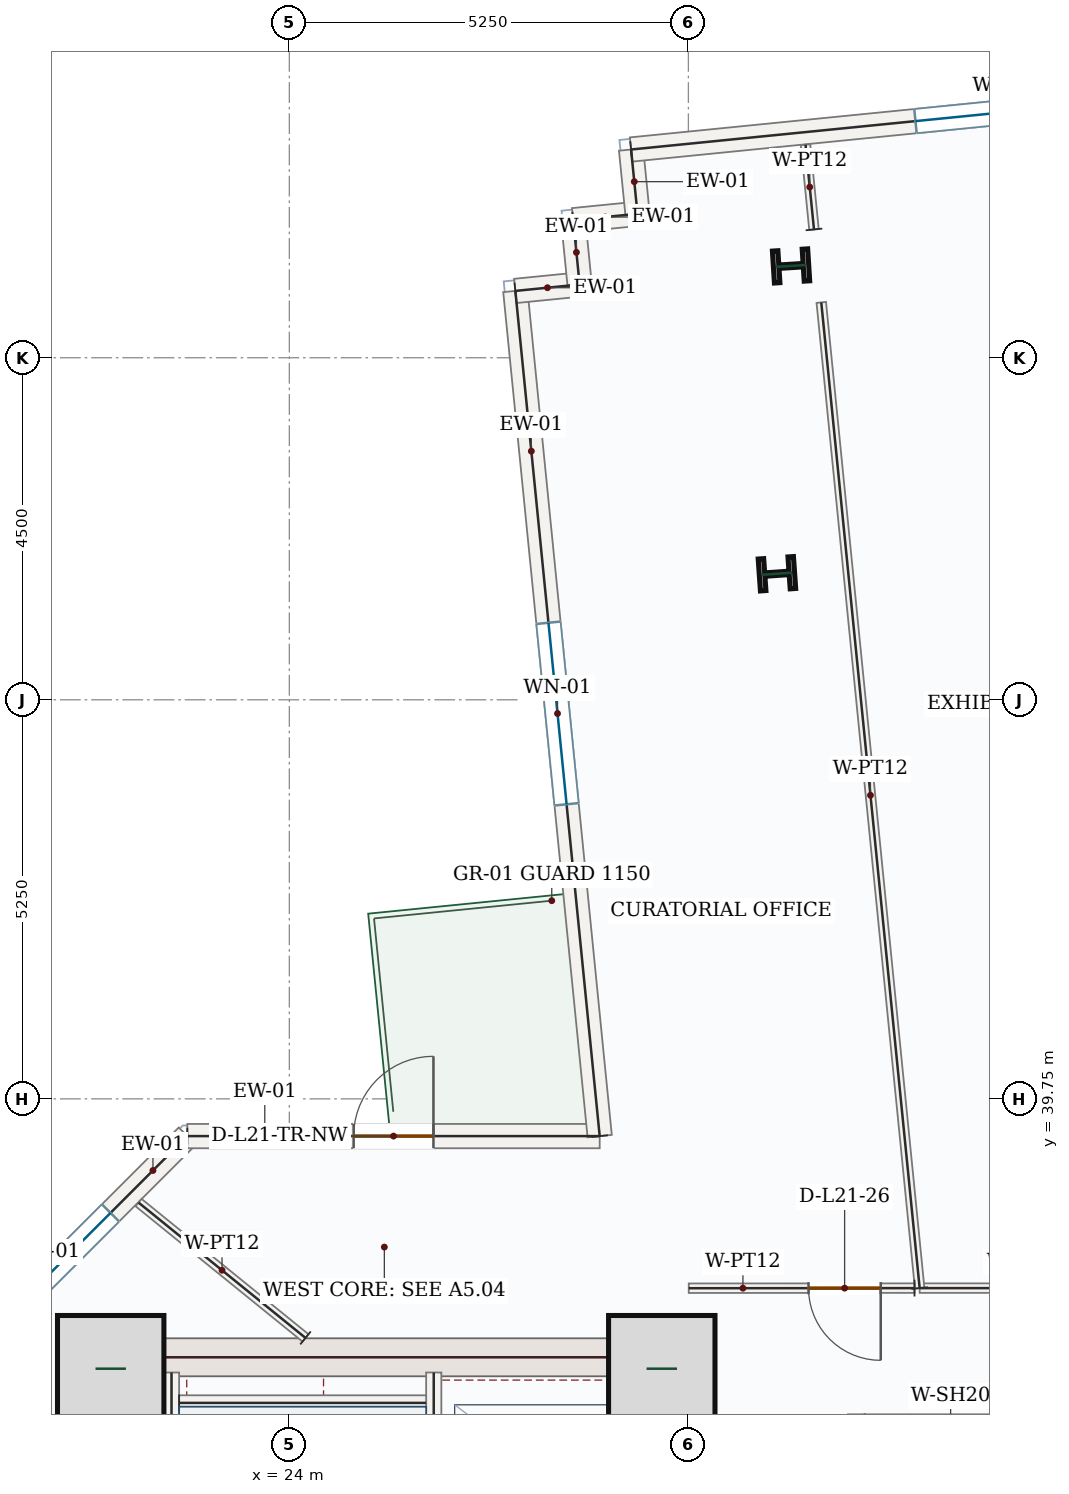
"""IFC4 building model, lengths in metres.
Left out: names, types, materials, properties, quantities, classifications, styles, units other than length and angle.
Written with IfcOpenShell. Run it as: python <this file> out.ifc"""

import sys

from ifc_helpers import new_model, si_unit, direction, frame, frame_2d, origin, origin_2d, place, context, subcontext, project, spatial, rectangle, i_section, extrude, source, transform, mapped, element, fill, save


model = new_model("IFC4")
c1 = context("Model", 3, precision=1e-05, world=origin(), true_north=direction((0.0, 1.0)))
c2 = subcontext(c1, "Body", "Model", "MODEL_VIEW")
j1 = project(units=[si_unit("LENGTHUNIT", "METRE"), si_unit("PLANEANGLEUNIT", "RADIAN")], contexts=[c1])
p1 = place(None, origin())
s1 = spatial("IfcSite", under=j1, at=p1, CompositionType="ELEMENT")
p2 = place(p1, origin())
s2 = spatial("IfcBuilding", under=s1, at=p2, CompositionType="ELEMENT")
p3 = place(p2, frame((0.0, 0.0, 96.3)))
s3 = spatial("IfcBuildingStorey", under=s2, at=p3, CompositionType="ELEMENT", Elevation=96.3)
m1 = source(origin(), c2, "Body", "SweptSolid", [
    extrude(rectangle(XDim=8.55, YDim=0.5, at=frame_2d((4.275, 0.0))), origin(), (0.0, 0.0, 1.0), 3.95),
])
p4 = place(p3, frame((21.5, 28.05, 0.0), z_axis=(0.0, 0.0, 1.0), x_axis=(0.0, 1.0, 0.0)))
e1 = element("IfcWall", 1, at=p4, inside=s3, PredefinedType="SHEAR", context=c2, shape_type="MappedRepresentation", body=[
    mapped(m1, transform((0.0, 0.0, 0.0), x_axis=(1.0, 0.0, 0.0), y_axis=(0.0, 1.0, 0.0), z_axis=(0.0, 0.0, 1.0), scale=1.0)),
])
p5 = place(p3, frame((29.0, 28.05, 0.0), z_axis=(0.0, 0.0, 1.0), x_axis=(0.0, 1.0, 0.0)))
e2 = element("IfcWall", 2, at=p5, inside=s3, PredefinedType="SHEAR", context=c2, shape_type="SweptSolid", body=[
    extrude(rectangle(XDim=8.55, YDim=0.5, at=frame_2d((4.275, 0.0))), origin(), (0.0, 0.0, 1.0), 3.95),
])
p6 = place(p5, frame((1.5, 0.0, 0.0)))
e3 = element("IfcOpeningElement", 3, at=p6, cuts=e2, PredefinedType="OPENING", context=c2, shape_type="SweptSolid", body=[
    extrude(rectangle(XDim=1.1, YDim=2.2, at=frame_2d((0.55, 1.1))), frame((0.0, 0.26, 0.0), z_axis=(0.0, -1.0, 0.0), x_axis=(1.0, 0.0, 0.0)), (0.0, 0.0, 1.0), 0.52),
])
m2 = source(origin(), c2, "Body", "SweptSolid", [
    extrude(rectangle(XDim=7.0, YDim=0.5, at=frame_2d((3.5, 0.0))), origin(), (0.0, 0.0, 1.0), 3.95),
])
p7 = place(p3, frame((21.75, 36.35, 0.0), z_axis=(0.0, 0.0, 1.0), x_axis=(1.0, 0.0, 0.0)))
e4 = element("IfcWall", 4, at=p7, inside=s3, PredefinedType="SHEAR", context=c2, shape_type="MappedRepresentation", body=[
    mapped(m2, transform((0.0, 0.0, 0.0), x_axis=(1.0, 0.0, 0.0), y_axis=(0.0, 1.0, 0.0), z_axis=(0.0, 0.0, 1.0), scale=1.0)),
])
m3 = source(origin(), c2, "Body", "SweptSolid", [
    extrude(rectangle(XDim=1.4, YDim=1.4, at=origin_2d()), origin(), (0.0, 0.0, 1.0), 4.2),
])
for number, where, z_axis, x_axis in (
    (5, (21.65, 36.2, 0.0), (0.0, 0.0, 1.0), (1.0, 0.0, 0.0)),
    (6, (28.9, 36.2, 0.0), (0.0, 0.0, 1.0), (1.0, 0.0, 0.0)),
):
    element("IfcColumn", number, at=place(p3, frame(where, z_axis=z_axis, x_axis=x_axis)), inside=s3, PredefinedType="COLUMN", context=c2, shape_type="MappedRepresentation", body=[
        mapped(m3, transform((0.0, 0.0, 0.0), x_axis=(1.0, 0.0, 0.0), y_axis=(0.0, 1.0, 0.0), z_axis=(0.0, 0.0, 1.0), scale=1.0)),
    ])
m4 = source(origin(), c2, "Body", "SweptSolid", [
    extrude(i_section(OverallWidth=0.421, OverallDepth=0.465, WebThickness=0.045, FlangeThickness=0.073, FilletRadius=0.018, at=origin_2d()), origin(), (0.0, 0.0, 1.0), 4.2),
])
for number, where, z_axis, x_axis in (
    (7, (30.415, 46.658, 0.0), (0.0, 0.0, 1.0), (-0.07, 0.998, 0.0)),
    (8, (30.601, 50.708, 0.0), (0.0, 0.0, 1.0), (-0.063, 0.998, 0.0)),
):
    element("IfcColumn", number, at=place(p3, frame(where, z_axis=z_axis, x_axis=x_axis)), inside=s3, PredefinedType="COLUMN", context=c2, shape_type="MappedRepresentation", body=[
        mapped(m4, transform((0.0, 0.0, 0.0), x_axis=(1.0, 0.0, 0.0), y_axis=(0.0, 1.0, 0.0), z_axis=(0.0, 0.0, 1.0), scale=1.0)),
    ])
p8 = place(p3, frame((18.94, 35.542, 0.0), z_axis=(0.0, 0.0, 1.0), x_axis=(0.707106781187, 0.707106781187, 0.0)))
e9 = element("IfcWall", 9, at=p8, inside=s3, PredefinedType="SOLIDWALL", context=c2, shape_type="SweptSolid", body=[
    extrude(rectangle(XDim=5.258, YDim=0.32, at=frame_2d((2.629, 0.0))), origin(), (0.0, 0.0, 1.0), 3.95),
])
p9 = place(p8, frame((1.429, 0.0, 0.85)))
e10 = element("IfcOpeningElement", 10, at=p9, cuts=e9, PredefinedType="OPENING", context=c2, shape_type="SweptSolid", body=[
    extrude(rectangle(XDim=2.4, YDim=1.8, at=frame_2d((1.2, 0.9))), frame((0.0, 0.17, 0.0), z_axis=(0.0, -1.0, 0.0), x_axis=(1.0, 0.0, 0.0)), (0.0, 0.0, 1.0), 0.34),
])
p10 = place(p3, frame((22.658, 39.26, 0.0), z_axis=(0.0, 0.0, 1.0), x_axis=(1.0, 0.0, 0.0)))
e11 = element("IfcWall", 11, at=p10, inside=s3, PredefinedType="SOLIDWALL", context=c2, shape_type="SweptSolid", body=[
    extrude(rectangle(XDim=5.425, YDim=0.32, at=frame_2d((2.713, 0.0))), origin(), (0.0, 0.0, 1.0), 3.95),
])
p11 = place(p10, frame((2.188, 0.0, 0.0)))
e12 = element("IfcOpeningElement", 12, at=p11, cuts=e11, PredefinedType="OPENING", context=c2, shape_type="SweptSolid", body=[
    extrude(rectangle(XDim=1.05, YDim=2.15, at=frame_2d((0.525, 1.075))), frame((0.0, 0.17, 0.0), z_axis=(0.0, -1.0, 0.0), x_axis=(1.0, 0.0, 0.0)), (0.0, 0.0, 1.0), 0.34),
])
p12 = place(p3, frame((28.083, 39.26, 0.0), z_axis=(0.0, 0.0, 1.0), x_axis=(-0.099322009391, 0.995055344416, 0.0)))
e13 = element("IfcWall", 13, at=p12, inside=s3, PredefinedType="SOLIDWALL", context=c2, shape_type="SweptSolid", body=[
    extrude(rectangle(XDim=11.174, YDim=0.32, at=frame_2d((5.587, 0.0))), origin(), (0.0, 0.0, 1.0), 3.95),
])
p13 = place(p12, frame((4.387, 0.0, 0.85)))
e14 = element("IfcOpeningElement", 14, at=p13, cuts=e13, PredefinedType="OPENING", context=c2, shape_type="SweptSolid", body=[
    extrude(rectangle(XDim=2.4, YDim=1.8, at=frame_2d((1.2, 0.9))), frame((0.0, 0.17, 0.0), z_axis=(0.0, -1.0, 0.0), x_axis=(1.0, 0.0, 0.0)), (0.0, 0.0, 1.0), 0.34),
])
m5 = source(origin(), c2, "Body", "SweptSolid", [
    extrude(rectangle(XDim=0.85, YDim=0.32, at=frame_2d((0.425, 0.0))), origin(), (0.0, 0.0, 1.0), 3.95),
])
p14 = place(p3, frame((26.973, 50.379, 0.0), z_axis=(0.0, 0.0, 1.0), x_axis=(0.995076929088, 0.099105525559, 0.0)))
e15 = element("IfcWall", 15, at=p14, inside=s3, PredefinedType="SOLIDWALL", context=c2, shape_type="MappedRepresentation", body=[
    mapped(m5, transform((0.0, 0.0, 0.0), x_axis=(1.0, 0.0, 0.0), y_axis=(0.0, 1.0, 0.0), z_axis=(0.0, 0.0, 1.0), scale=1.0)),
])
m6 = source(origin(), c2, "Body", "SweptSolid", [
    extrude(rectangle(XDim=0.85, YDim=0.32, at=frame_2d((0.425, 0.0))), origin(), (0.0, 0.0, 1.0), 3.95),
])
for number, where, z_axis, x_axis in (
    (16, (27.819, 50.463, 0.0), (0.0, 0.0, 1.0), (-0.099, 0.995, 0.0)),
    (17, (27.735, 51.309, 0.0), (0.0, 0.0, 1.0), (0.995, 0.099, 0.0)),
):
    element("IfcWall", number, at=place(p3, frame(where, z_axis=z_axis, x_axis=x_axis)), inside=s3, PredefinedType="SOLIDWALL", context=c2, shape_type="MappedRepresentation", body=[
        mapped(m6, transform((0.0, 0.0, 0.0), x_axis=(1.0, 0.0, 0.0), y_axis=(0.0, 1.0, 0.0), z_axis=(0.0, 0.0, 1.0), scale=1.0)),
    ])
p15 = place(p3, frame((28.581, 51.394, 0.0), z_axis=(0.0, 0.0, 1.0), x_axis=(-0.09938995433, 0.995048560111, 0.0)))
e18 = element("IfcWall", 18, at=p15, inside=s3, PredefinedType="SOLIDWALL", context=c2, shape_type="MappedRepresentation", body=[
    mapped(m5, transform((0.0, 0.0, 0.0), x_axis=(1.0, 0.0, 0.0), y_axis=(0.0, 1.0, 0.0), z_axis=(0.0, 0.0, 1.0), scale=1.0)),
])
p16 = place(p3, frame((28.496, 52.24, 0.0), z_axis=(0.0, 0.0, 1.0), x_axis=(0.995054718915, 0.09932827576, 0.0)))
e19 = element("IfcWall", 19, at=p16, inside=s3, PredefinedType="SOLIDWALL", context=c2, shape_type="SweptSolid", body=[
    extrude(rectangle(XDim=9.92, YDim=0.32, at=frame_2d((4.96, 0.0))), origin(), (0.0, 0.0, 1.0), 3.95),
])
p17 = place(p16, frame((3.76, 0.0, 0.85)))
e20 = element("IfcOpeningElement", 20, at=p17, cuts=e19, PredefinedType="OPENING", context=c2, shape_type="SweptSolid", body=[
    extrude(rectangle(XDim=2.4, YDim=1.8, at=frame_2d((1.2, 0.9))), frame((0.0, 0.17, 0.0), z_axis=(0.0, -1.0, 0.0), x_axis=(1.0, 0.0, 0.0)), (0.0, 0.0, 1.0), 0.34),
])
m7 = source(origin(), c2, "Body", "SweptSolid", [
    extrude(rectangle(XDim=7.87, YDim=0.2, at=frame_2d((3.935, 0.0))), origin(), (0.0, 0.0, 1.0), 3.95),
])
p18 = place(p3, frame((22.45, 28.28, 0.0), z_axis=(0.0, 0.0, 1.0), x_axis=(0.0, 1.0, 0.0)))
e21 = element("IfcWall", 21, at=p18, inside=s3, PredefinedType="SOLIDWALL", context=c2, shape_type="MappedRepresentation", body=[
    mapped(m7, transform((0.0, 0.0, 0.0), x_axis=(1.0, 0.0, 0.0), y_axis=(0.0, 1.0, 0.0), z_axis=(0.0, 0.0, 1.0), scale=1.0)),
])
p19 = place(p3, frame((25.9, 28.15, 0.0), z_axis=(0.0, 0.0, 1.0), x_axis=(0.0, 1.0, 0.0)))
e22 = element("IfcWall", 22, at=p19, inside=s3, PredefinedType="SOLIDWALL", context=c2, shape_type="SweptSolid", body=[
    extrude(rectangle(XDim=8.0, YDim=0.2, at=frame_2d((4.0, 0.0))), origin(), (0.0, 0.0, 1.0), 3.95),
])
p20 = place(p19, frame((0.4, 0.0, 0.0)))
e23 = element("IfcOpeningElement", 23, at=p20, cuts=e22, PredefinedType="OPENING", context=c2, shape_type="SweptSolid", body=[
    extrude(rectangle(XDim=1.05, YDim=2.15, at=frame_2d((0.525, 1.075))), frame((0.0, 0.11, 0.0), z_axis=(0.0, -1.0, 0.0), x_axis=(1.0, 0.0, 0.0)), (0.0, 0.0, 1.0), 0.22),
])
m8 = source(origin(), c2, "Body", "SweptSolid", [
    extrude(rectangle(XDim=3.25, YDim=0.2, at=frame_2d((1.625, 0.0))), origin(), (0.0, 0.0, 1.0), 3.95),
])
p21 = place(p3, frame((22.55, 35.75, 0.0), z_axis=(0.0, 0.0, 1.0), x_axis=(1.0, 0.0, 0.0)))
e24 = element("IfcWall", 24, at=p21, inside=s3, PredefinedType="SOLIDWALL", context=c2, shape_type="MappedRepresentation", body=[
    mapped(m8, transform((0.0, 0.0, 0.0), x_axis=(1.0, 0.0, 0.0), y_axis=(0.0, 1.0, 0.0), z_axis=(0.0, 0.0, 1.0), scale=1.0)),
])
m9 = source(origin(), c2, "Body", "SweptSolid", [
    extrude(rectangle(XDim=2.4, YDim=0.2, at=frame_2d((1.2, 0.0))), origin(), (0.0, 0.0, 1.0), 3.95),
])
p22 = place(p3, frame((31.45, 33.2, 0.0), z_axis=(0.0, 0.0, 1.0), x_axis=(0.0, 1.0, 0.0)))
e25 = element("IfcWall", 25, at=p22, inside=s3, PredefinedType="SOLIDWALL", context=c2, shape_type="MappedRepresentation", body=[
    mapped(m9, transform((0.0, 0.0, 0.0), x_axis=(1.0, 0.0, 0.0), y_axis=(0.0, 1.0, 0.0), z_axis=(0.0, 0.0, 1.0), scale=1.0)),
])
p23 = place(p3, frame((36.968, 37.26, 0.0), z_axis=(0.0, 0.0, 1.0), x_axis=(-1.0, 0.0, 0.0)))
e26 = element("IfcWall", 26, at=p23, inside=s3, PredefinedType="PARTITIONING", context=c2, shape_type="SweptSolid", body=[
    extrude(rectangle(XDim=4.676, YDim=0.125, at=frame_2d((2.338, 0.0))), origin(), (0.0, 0.0, 1.0), 3.95),
])
p24 = place(p23, frame((0.82, 0.0, 0.0)))
e27 = element("IfcOpeningElement", 27, at=p24, cuts=e26, PredefinedType="OPENING", context=c2, shape_type="SweptSolid", body=[
    extrude(rectangle(XDim=0.95, YDim=2.15, at=frame_2d((0.475, 1.075))), frame((0.0, 0.073, 0.0), z_axis=(0.0, -1.0, 0.0), x_axis=(1.0, 0.0, 0.0)), (0.0, 0.0, 1.0), 0.145),
])
m10 = source(origin(), c2, "Body", "SweptSolid", [
    extrude(rectangle(XDim=13.032, YDim=0.125, at=frame_2d((6.516, 0.0))), origin(), (0.0, 0.0, 1.0), 3.95),
])
p25 = place(p3, frame((32.293, 37.26, 0.0), z_axis=(0.0, 0.0, 1.0), x_axis=(-0.099325655293, 0.995054980491, 0.0)))
e28 = element("IfcWall", 28, at=p25, inside=s3, PredefinedType="PARTITIONING", context=c2, shape_type="MappedRepresentation", body=[
    mapped(m10, transform((0.0, 0.0, 0.0), x_axis=(1.0, 0.0, 0.0), y_axis=(0.0, 1.0, 0.0), z_axis=(0.0, 0.0, 1.0), scale=1.0)),
])
m11 = source(origin(), c2, "Body", "SweptSolid", [
    extrude(rectangle(XDim=1.121, YDim=0.125, at=frame_2d((0.56, 0.0))), origin(), (0.0, 0.0, 1.0), 3.95),
])
p26 = place(p3, frame((30.902, 51.188, 0.0), z_axis=(0.0, 0.0, 1.0), x_axis=(-0.099352712797, 0.99505227926, 0.0)))
e29 = element("IfcWall", 29, at=p26, inside=s3, PredefinedType="PARTITIONING", context=c2, shape_type="MappedRepresentation", body=[
    mapped(m11, transform((0.0, 0.0, 0.0), x_axis=(1.0, 0.0, 0.0), y_axis=(0.0, 1.0, 0.0), z_axis=(0.0, 0.0, 1.0), scale=1.0)),
])
p27 = place(p3, frame((32.225, 37.26, 0.0), z_axis=(0.0, 0.0, 1.0), x_axis=(-0.999999915533, -0.000411015173, 0.0)))
e30 = element("IfcWall", 30, at=p27, inside=s3, PredefinedType="PARTITIONING", context=c2, shape_type="SweptSolid", body=[
    extrude(rectangle(XDim=2.97, YDim=0.125, at=frame_2d((1.485, 0.0))), origin(), (0.0, 0.0, 1.0), 3.95),
])
p28 = place(p27, frame((0.444, 0.0, 0.0)))
e31 = element("IfcOpeningElement", 31, at=p28, cuts=e30, PredefinedType="OPENING", context=c2, shape_type="SweptSolid", body=[
    extrude(rectangle(XDim=0.95, YDim=2.15, at=frame_2d((0.475, 1.075))), frame((0.0, 0.073, 0.0), z_axis=(0.0, -1.0, 0.0), x_axis=(1.0, 0.0, 0.0)), (0.0, 0.0, 1.0), 0.145),
])
m12 = source(origin(), c2, "Body", "SweptSolid", [
    extrude(rectangle(XDim=2.827, YDim=0.125, at=frame_2d((1.414, 0.0))), origin(), (0.0, 0.0, 1.0), 3.95),
])
p29 = place(p3, frame((24.213, 36.605, 0.0), z_axis=(0.0, 0.0, 1.0), x_axis=(-0.776808269954, 0.62973717671, 0.0)))
e32 = element("IfcWall", 32, at=p29, inside=s3, PredefinedType="PARTITIONING", context=c2, shape_type="MappedRepresentation", body=[
    mapped(m12, transform((0.0, 0.0, 0.0), x_axis=(1.0, 0.0, 0.0), y_axis=(0.0, 1.0, 0.0), z_axis=(0.0, 0.0, 1.0), scale=1.0)),
])
m13 = source(origin(), c2, "Body", "SweptSolid", [
    extrude(rectangle(XDim=2.4, YDim=1.8, at=frame_2d((1.2, 0.9))), frame((0.0, 0.03, 0.0), z_axis=(0.0, -1.0, 0.0), x_axis=(1.0, 0.0, 0.0)), (0.0, 0.0, 1.0), 0.06),
])
p30 = place(p9, origin())
e33 = element("IfcWindow", 33, at=p30, inside=s3, PartitioningType="DOUBLE_PANEL_VERTICAL", PredefinedType="WINDOW", context=c2, shape_type="MappedRepresentation", body=[
    mapped(m13, transform((0.0, 0.0, 0.0), x_axis=(1.0, 0.0, 0.0), y_axis=(0.0, 1.0, 0.0), z_axis=(0.0, 0.0, 1.0), scale=1.0)),
])
fill(e10, e33)
m14 = source(origin(), c2, "Body", "SweptSolid", [
    extrude(rectangle(XDim=1.05, YDim=2.15, at=frame_2d((0.525, 1.075))), frame((0.0, 0.025, 0.0), z_axis=(0.0, -1.0, 0.0), x_axis=(1.0, 0.0, 0.0)), (0.0, 0.0, 1.0), 0.05),
])
p31 = place(p11, origin())
e34 = element("IfcDoor", 34, at=p31, inside=s3, OperationType="SINGLE_SWING_RIGHT", PredefinedType="DOOR", context=c2, shape_type="MappedRepresentation", body=[
    mapped(m14, transform((0.0, 0.0, 0.0), x_axis=(1.0, 0.0, 0.0), y_axis=(0.0, 1.0, 0.0), z_axis=(0.0, 0.0, 1.0), scale=1.0)),
])
fill(e12, e34)
p32 = place(p13, origin())
e35 = element("IfcWindow", 35, at=p32, inside=s3, PartitioningType="DOUBLE_PANEL_VERTICAL", PredefinedType="WINDOW", context=c2, shape_type="MappedRepresentation", body=[
    mapped(m13, transform((0.0, 0.0, 0.0), x_axis=(1.0, 0.0, 0.0), y_axis=(0.0, 1.0, 0.0), z_axis=(0.0, 0.0, 1.0), scale=1.0)),
])
fill(e14, e35)
p33 = place(p17, origin())
e36 = element("IfcWindow", 36, at=p33, inside=s3, PartitioningType="DOUBLE_PANEL_VERTICAL", PredefinedType="WINDOW", context=c2, shape_type="MappedRepresentation", body=[
    mapped(m13, transform((0.0, 0.0, 0.0), x_axis=(1.0, 0.0, 0.0), y_axis=(0.0, 1.0, 0.0), z_axis=(0.0, 0.0, 1.0), scale=1.0)),
])
fill(e20, e36)
m15 = source(origin(), c2, "Body", "SweptSolid", [
    extrude(rectangle(XDim=0.95, YDim=2.15, at=frame_2d((0.475, 1.075))), frame((0.0, 0.025, 0.0), z_axis=(0.0, -1.0, 0.0), x_axis=(1.0, 0.0, 0.0)), (0.0, 0.0, 1.0), 0.05),
])
p34 = place(p28, origin())
e37 = element("IfcDoor", 37, at=p34, inside=s3, OperationType="SINGLE_SWING_LEFT", PredefinedType="DOOR", context=c2, shape_type="MappedRepresentation", body=[
    mapped(m15, transform((0.0, 0.0, 0.0), x_axis=(1.0, 0.0, 0.0), y_axis=(0.0, 1.0, 0.0), z_axis=(0.0, 0.0, 1.0), scale=1.0)),
])
fill(e31, e37)
save(model, sys.argv[1])
